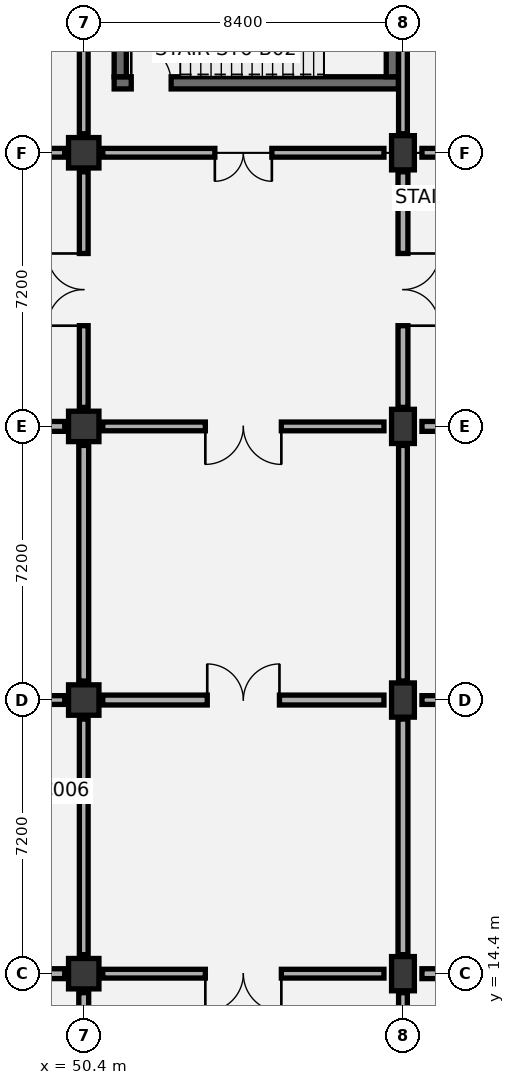
"""IFC4 building model, lengths in metres.
Left out: names, types, materials, properties, quantities, classifications, styles, units other than length and angle.
Written with IfcOpenShell. Run it as: python <this file> out.ifc"""

import sys

from ifc_helpers import new_model, si_unit, direction, frame, frame_2d, origin, origin_2d, place, context, subcontext, project, spatial, rectangle, extrude, element, fill, save


model = new_model("IFC4")
c1 = context("Model", 3, precision=1e-05, world=origin(), true_north=direction((0.0, 1.0)))
c2 = subcontext(c1, "Body", "Model", "MODEL_VIEW")
j1 = project(units=[si_unit("LENGTHUNIT", "METRE"), si_unit("PLANEANGLEUNIT", "RADIAN")], contexts=[c1])
p1 = place(None, origin())
s1 = spatial("IfcSite", under=j1, at=p1, CompositionType="ELEMENT")
p2 = place(p1, origin())
s2 = spatial("IfcBuilding", under=s1, at=p2, CompositionType="ELEMENT")
p3 = place(p2, frame((0.0, 0.0, -9.6)))
s3 = spatial("IfcBuildingStorey", under=s2, at=p3, CompositionType="ELEMENT", Elevation=-9.6)
for number, where, z_axis, x_axis in (
    (1, (50.4, 14.4, 0.0), (0.0, 0.0, 1.0), (1.0, 0.0, 0.0)),
    (2, (50.4, 21.6, 0.0), (0.0, 0.0, 1.0), (1.0, 0.0, 0.0)),
    (3, (50.4, 28.8, 0.0), (0.0, 0.0, 1.0), (1.0, 0.0, 0.0)),
    (4, (50.4, 36.0, 0.0), (0.0, 0.0, 1.0), (1.0, 0.0, 0.0)),
):
    element("IfcColumn", number, at=place(p3, frame(where, z_axis=z_axis, x_axis=x_axis)), inside=s3, PredefinedType="COLUMN", context=c2, shape_type="SweptSolid", body=[
        extrude(rectangle(XDim=0.8, YDim=0.8, at=origin_2d()), origin(), (0.0, 0.0, 1.0), 4.8),
    ])
for number, where, z_axis, x_axis in (
    (5, (58.8, 14.4, 0.0), (0.0, 0.0, 1.0), (1.0, 0.0, 0.0)),
    (6, (58.8, 21.6, 0.0), (0.0, 0.0, 1.0), (1.0, 0.0, 0.0)),
    (7, (58.8, 28.8, 0.0), (0.0, 0.0, 1.0), (1.0, 0.0, 0.0)),
    (8, (58.8, 36.0, 0.0), (0.0, 0.0, 1.0), (1.0, 0.0, 0.0)),
):
    element("IfcColumn", number, at=place(p3, frame(where, z_axis=z_axis, x_axis=x_axis)), inside=s3, PredefinedType="COLUMN", context=c2, shape_type="SweptSolid", body=[
        extrude(rectangle(XDim=0.6, YDim=0.9, at=origin_2d()), origin(), (0.0, 0.0, 1.0), 4.8),
    ])
p4 = place(p3, frame((51.2, 37.84, 0.0), z_axis=(0.0, 0.0, 1.0), x_axis=(1.0, 0.0, 0.0)))
e9 = element("IfcWall", 9, at=p4, inside=s3, PredefinedType="SHEAR", context=c2, shape_type="SweptSolid", body=[
    extrude(rectangle(XDim=7.48, YDim=0.32, at=frame_2d((3.74, 0.0))), origin(), (0.0, 0.0, 1.0), 4.4),
])
p5 = place(p4, frame((0.45, 0.0, 0.0)))
e10 = element("IfcOpeningElement", 10, at=p5, cuts=e9, PredefinedType="OPENING", context=c2, shape_type="SweptSolid", body=[
    extrude(rectangle(XDim=1.05, YDim=2.15, at=frame_2d((0.525, 1.075))), frame((0.0, 0.17, 0.0), z_axis=(0.0, -1.0, 0.0), x_axis=(1.0, 0.0, 0.0)), (0.0, 0.0, 1.0), 0.34),
])
for number, where, z_axis, x_axis in (
    (11, (51.36, 38.0, 0.0), (0.0, 0.0, 1.0), (0.0, 1.0, 0.0)),
    (12, (58.52, 38.0, 0.0), (0.0, 0.0, 1.0), (0.0, 1.0, 0.0)),
):
    element("IfcWall", number, at=place(p3, frame(where, z_axis=z_axis, x_axis=x_axis)), inside=s3, PredefinedType="SHEAR", context=c2, shape_type="SweptSolid", body=[
        extrude(rectangle(XDim=3.8, YDim=0.32, at=frame_2d((1.9, 0.0))), origin(), (0.0, 0.0, 1.0), 4.4),
    ])
p6 = place(p3, frame((42.15, 19.2, 0.0), z_axis=(0.0, 0.0, 1.0), x_axis=(1.0, 0.0, 0.0)))
e13 = element("IfcWall", 13, at=p6, inside=s3, PredefinedType="PARTITIONING", context=c2, shape_type="SweptSolid", body=[
    extrude(rectangle(XDim=8.1, YDim=0.12, at=frame_2d((4.05, 0.0))), origin(), (0.0, 0.0, 1.0), 4.4),
])
p7 = place(p6, frame((1.08, 0.0, 0.0)))
e14 = element("IfcOpeningElement", 14, at=p7, cuts=e13, PredefinedType="OPENING", context=c2, shape_type="SweptSolid", body=[
    extrude(rectangle(XDim=0.95, YDim=2.1, at=frame_2d((0.475, 1.05))), frame((0.0, 0.07, 0.0), z_axis=(0.0, -1.0, 0.0), x_axis=(1.0, 0.0, 0.0)), (0.0, 0.0, 1.0), 0.14),
])
p8 = place(p6, frame((3.63, 0.0, 0.0)))
e15 = element("IfcOpeningElement", 15, at=p8, cuts=e13, PredefinedType="OPENING", context=c2, shape_type="SweptSolid", body=[
    extrude(rectangle(XDim=0.9, YDim=2.1, at=frame_2d((0.45, 1.05))), frame((0.0, 0.07, 0.0), z_axis=(0.0, -1.0, 0.0), x_axis=(1.0, 0.0, 0.0)), (0.0, 0.0, 1.0), 0.14),
])
p9 = place(p6, frame((6.13, 0.0, 0.0)))
e16 = element("IfcOpeningElement", 16, at=p9, cuts=e13, PredefinedType="OPENING", context=c2, shape_type="SweptSolid", body=[
    extrude(rectangle(XDim=1.0, YDim=2.1, at=frame_2d((0.5, 1.05))), frame((0.0, 0.07, 0.0), z_axis=(0.0, -1.0, 0.0), x_axis=(1.0, 0.0, 0.0)), (0.0, 0.0, 1.0), 0.14),
])
p10 = place(p3, frame((50.4, 7.7, 0.0), z_axis=(0.0, 0.0, 1.0), x_axis=(0.0, 1.0, 0.0)))
e17 = element("IfcWall", 17, at=p10, inside=s3, PredefinedType="PARTITIONING", context=c2, shape_type="SweptSolid", body=[
    extrude(rectangle(XDim=6.2, YDim=0.26, at=frame_2d((3.1, 0.0))), origin(), (0.0, 0.0, 1.0), 3.595),
])
p11 = place(p10, frame((2.1, 0.0, 0.0)))
e18 = element("IfcOpeningElement", 18, at=p11, cuts=e17, PredefinedType="OPENING", context=c2, shape_type="SweptSolid", body=[
    extrude(rectangle(XDim=2.0, YDim=2.35, at=frame_2d((1.0, 1.175))), frame((0.0, 0.14, 0.0), z_axis=(0.0, -1.0, 0.0), x_axis=(1.0, 0.0, 0.0)), (0.0, 0.0, 1.0), 0.28),
])
p12 = place(p3, frame((42.5, 14.4, 0.0), z_axis=(0.0, 0.0, 1.0), x_axis=(1.0, 0.0, 0.0)))
e19 = element("IfcWall", 19, at=p12, inside=s3, PredefinedType="PARTITIONING", context=c2, shape_type="SweptSolid", body=[
    extrude(rectangle(XDim=7.4, YDim=0.26, at=frame_2d((3.7, 0.0))), origin(), (0.0, 0.0, 1.0), 3.495),
])
p13 = place(p3, frame((50.4, 14.9, 0.0), z_axis=(0.0, 0.0, 1.0), x_axis=(0.0, 1.0, 0.0)))
e20 = element("IfcWall", 20, at=p13, inside=s3, PredefinedType="PARTITIONING", context=c2, shape_type="SweptSolid", body=[
    extrude(rectangle(XDim=6.2, YDim=0.23, at=frame_2d((3.1, 0.0))), origin(), (0.0, 0.0, 1.0), 3.595),
])
p14 = place(p3, frame((42.5, 21.6, 0.0), z_axis=(0.0, 0.0, 1.0), x_axis=(1.0, 0.0, 0.0)))
e21 = element("IfcWall", 21, at=p14, inside=s3, PredefinedType="PARTITIONING", context=c2, shape_type="SweptSolid", body=[
    extrude(rectangle(XDim=7.4, YDim=0.23, at=frame_2d((3.7, 0.0))), origin(), (0.0, 0.0, 1.0), 3.495),
])
p15 = place(p14, frame((2.75, 0.0, 0.0)))
e22 = element("IfcOpeningElement", 22, at=p15, cuts=e21, PredefinedType="OPENING", context=c2, shape_type="SweptSolid", body=[
    extrude(rectangle(XDim=1.9, YDim=2.3, at=frame_2d((0.95, 1.15))), frame((0.0, 0.125, 0.0), z_axis=(0.0, -1.0, 0.0), x_axis=(1.0, 0.0, 0.0)), (0.0, 0.0, 1.0), 0.25),
])
p16 = place(p3, frame((50.4, 22.1, 0.0), z_axis=(0.0, 0.0, 1.0), x_axis=(0.0, 1.0, 0.0)))
e23 = element("IfcWall", 23, at=p16, inside=s3, PredefinedType="PARTITIONING", context=c2, shape_type="SweptSolid", body=[
    extrude(rectangle(XDim=6.2, YDim=0.26, at=frame_2d((3.1, 0.0))), origin(), (0.0, 0.0, 1.0), 3.595),
])
p17 = place(p3, frame((42.5, 28.8, 0.0), z_axis=(0.0, 0.0, 1.0), x_axis=(1.0, 0.0, 0.0)))
e24 = element("IfcWall", 24, at=p17, inside=s3, PredefinedType="PARTITIONING", context=c2, shape_type="SweptSolid", body=[
    extrude(rectangle(XDim=7.4, YDim=0.26, at=frame_2d((3.7, 0.0))), origin(), (0.0, 0.0, 1.0), 3.495),
])
p18 = place(p17, frame((2.7, 0.0, 0.0)))
e25 = element("IfcOpeningElement", 25, at=p18, cuts=e24, PredefinedType="OPENING", context=c2, shape_type="SweptSolid", body=[
    extrude(rectangle(XDim=2.0, YDim=2.35, at=frame_2d((1.0, 1.175))), frame((0.0, 0.14, 0.0), z_axis=(0.0, -1.0, 0.0), x_axis=(1.0, 0.0, 0.0)), (0.0, 0.0, 1.0), 0.28),
])
p19 = place(p3, frame((50.4, 29.3, 0.0), z_axis=(0.0, 0.0, 1.0), x_axis=(0.0, 1.0, 0.0)))
e26 = element("IfcWall", 26, at=p19, inside=s3, PredefinedType="PARTITIONING", context=c2, shape_type="SweptSolid", body=[
    extrude(rectangle(XDim=6.2, YDim=0.23, at=frame_2d((3.1, 0.0))), origin(), (0.0, 0.0, 1.0), 3.595),
])
p20 = place(p19, frame((2.15, 0.0, 0.0)))
e27 = element("IfcOpeningElement", 27, at=p20, cuts=e26, PredefinedType="OPENING", context=c2, shape_type="SweptSolid", body=[
    extrude(rectangle(XDim=1.9, YDim=2.3, at=frame_2d((0.95, 1.15))), frame((0.0, 0.125, 0.0), z_axis=(0.0, -1.0, 0.0), x_axis=(1.0, 0.0, 0.0)), (0.0, 0.0, 1.0), 0.25),
])
p21 = place(p3, frame((42.5, 36.0, 0.0), z_axis=(0.0, 0.0, 1.0), x_axis=(1.0, 0.0, 0.0)))
e28 = element("IfcWall", 28, at=p21, inside=s3, PredefinedType="PARTITIONING", context=c2, shape_type="SweptSolid", body=[
    extrude(rectangle(XDim=7.4, YDim=0.23, at=frame_2d((3.7, 0.0))), origin(), (0.0, 0.0, 1.0), 3.495),
])
p22 = place(p21, frame((2.95, 0.0, 0.0)))
e29 = element("IfcOpeningElement", 29, at=p22, cuts=e28, PredefinedType="OPENING", context=c2, shape_type="SweptSolid", body=[
    extrude(rectangle(XDim=1.5, YDim=2.15, at=frame_2d((0.75, 1.075))), frame((0.0, 0.125, 0.0), z_axis=(0.0, -1.0, 0.0), x_axis=(1.0, 0.0, 0.0)), (0.0, 0.0, 1.0), 0.25),
])
for number, where, z_axis, x_axis in (
    (30, (50.4, 36.5, 0.0), (0.0, 0.0, 1.0), (0.0, 1.0, 0.0)),
    (31, (58.8, 7.7, 0.0), (0.0, 0.0, 1.0), (0.0, 1.0, 0.0)),
):
    element("IfcWall", number, at=place(p3, frame(where, z_axis=z_axis, x_axis=x_axis)), inside=s3, PredefinedType="PARTITIONING", context=c2, shape_type="SweptSolid", body=[
        extrude(rectangle(XDim=6.2, YDim=0.23, at=frame_2d((3.1, 0.0))), origin(), (0.0, 0.0, 1.0), 3.595),
    ])
p23 = place(p3, frame((50.9, 14.4, 0.0), z_axis=(0.0, 0.0, 1.0), x_axis=(1.0, 0.0, 0.0)))
e32 = element("IfcWall", 32, at=p23, inside=s3, PredefinedType="PARTITIONING", context=c2, shape_type="SweptSolid", body=[
    extrude(rectangle(XDim=7.4, YDim=0.23, at=frame_2d((3.7, 0.0))), origin(), (0.0, 0.0, 1.0), 3.495),
])
p24 = place(p23, frame((2.7, 0.0, 0.0)))
e33 = element("IfcOpeningElement", 33, at=p24, cuts=e32, PredefinedType="OPENING", context=c2, shape_type="SweptSolid", body=[
    extrude(rectangle(XDim=2.0, YDim=2.35, at=frame_2d((1.0, 1.175))), frame((0.0, 0.125, 0.0), z_axis=(0.0, -1.0, 0.0), x_axis=(1.0, 0.0, 0.0)), (0.0, 0.0, 1.0), 0.25),
])
p25 = place(p3, frame((58.8, 14.9, 0.0), z_axis=(0.0, 0.0, 1.0), x_axis=(0.0, 1.0, 0.0)))
e34 = element("IfcWall", 34, at=p25, inside=s3, PredefinedType="PARTITIONING", context=c2, shape_type="SweptSolid", body=[
    extrude(rectangle(XDim=6.2, YDim=0.26, at=frame_2d((3.1, 0.0))), origin(), (0.0, 0.0, 1.0), 3.595),
])
p26 = place(p3, frame((50.9, 21.6, 0.0), z_axis=(0.0, 0.0, 1.0), x_axis=(1.0, 0.0, 0.0)))
e35 = element("IfcWall", 35, at=p26, inside=s3, PredefinedType="PARTITIONING", context=c2, shape_type="SweptSolid", body=[
    extrude(rectangle(XDim=7.4, YDim=0.26, at=frame_2d((3.7, 0.0))), origin(), (0.0, 0.0, 1.0), 3.495),
])
p27 = place(p26, frame((2.75, 0.0, 0.0)))
e36 = element("IfcOpeningElement", 36, at=p27, cuts=e35, PredefinedType="OPENING", context=c2, shape_type="SweptSolid", body=[
    extrude(rectangle(XDim=1.9, YDim=2.3, at=frame_2d((0.95, 1.15))), frame((0.0, 0.14, 0.0), z_axis=(0.0, -1.0, 0.0), x_axis=(1.0, 0.0, 0.0)), (0.0, 0.0, 1.0), 0.28),
])
p28 = place(p3, frame((58.8, 22.1, 0.0), z_axis=(0.0, 0.0, 1.0), x_axis=(0.0, 1.0, 0.0)))
e37 = element("IfcWall", 37, at=p28, inside=s3, PredefinedType="PARTITIONING", context=c2, shape_type="SweptSolid", body=[
    extrude(rectangle(XDim=6.2, YDim=0.23, at=frame_2d((3.1, 0.0))), origin(), (0.0, 0.0, 1.0), 3.595),
])
p29 = place(p3, frame((50.9, 28.8, 0.0), z_axis=(0.0, 0.0, 1.0), x_axis=(1.0, 0.0, 0.0)))
e38 = element("IfcWall", 38, at=p29, inside=s3, PredefinedType="PARTITIONING", context=c2, shape_type="SweptSolid", body=[
    extrude(rectangle(XDim=7.4, YDim=0.23, at=frame_2d((3.7, 0.0))), origin(), (0.0, 0.0, 1.0), 3.495),
])
p30 = place(p29, frame((2.7, 0.0, 0.0)))
e39 = element("IfcOpeningElement", 39, at=p30, cuts=e38, PredefinedType="OPENING", context=c2, shape_type="SweptSolid", body=[
    extrude(rectangle(XDim=2.0, YDim=2.35, at=frame_2d((1.0, 1.175))), frame((0.0, 0.125, 0.0), z_axis=(0.0, -1.0, 0.0), x_axis=(1.0, 0.0, 0.0)), (0.0, 0.0, 1.0), 0.25),
])
p31 = place(p3, frame((58.8, 29.3, 0.0), z_axis=(0.0, 0.0, 1.0), x_axis=(0.0, 1.0, 0.0)))
e40 = element("IfcWall", 40, at=p31, inside=s3, PredefinedType="PARTITIONING", context=c2, shape_type="SweptSolid", body=[
    extrude(rectangle(XDim=6.2, YDim=0.26, at=frame_2d((3.1, 0.0))), origin(), (0.0, 0.0, 1.0), 3.595),
])
p32 = place(p31, frame((2.15, 0.0, 0.0)))
e41 = element("IfcOpeningElement", 41, at=p32, cuts=e40, PredefinedType="OPENING", context=c2, shape_type="SweptSolid", body=[
    extrude(rectangle(XDim=1.9, YDim=2.3, at=frame_2d((0.95, 1.15))), frame((0.0, 0.14, 0.0), z_axis=(0.0, -1.0, 0.0), x_axis=(1.0, 0.0, 0.0)), (0.0, 0.0, 1.0), 0.28),
])
p33 = place(p3, frame((50.9, 36.0, 0.0), z_axis=(0.0, 0.0, 1.0), x_axis=(1.0, 0.0, 0.0)))
e42 = element("IfcWall", 42, at=p33, inside=s3, PredefinedType="PARTITIONING", context=c2, shape_type="SweptSolid", body=[
    extrude(rectangle(XDim=7.4, YDim=0.23, at=frame_2d((3.7, 0.0))), origin(), (0.0, 0.0, 1.0), 3.495),
])
p34 = place(p33, frame((2.95, 0.0, 0.0)))
e43 = element("IfcOpeningElement", 43, at=p34, cuts=e42, PredefinedType="OPENING", context=c2, shape_type="SweptSolid", body=[
    extrude(rectangle(XDim=1.5, YDim=2.15, at=frame_2d((0.75, 1.075))), frame((0.0, 0.125, 0.0), z_axis=(0.0, -1.0, 0.0), x_axis=(1.0, 0.0, 0.0)), (0.0, 0.0, 1.0), 0.25),
])
p35 = place(p3, frame((58.8, 36.5, 0.0), z_axis=(0.0, 0.0, 1.0), x_axis=(0.0, 1.0, 0.0)))
e44 = element("IfcWall", 44, at=p35, inside=s3, PredefinedType="PARTITIONING", context=c2, shape_type="SweptSolid", body=[
    extrude(rectangle(XDim=6.2, YDim=0.23, at=frame_2d((3.1, 0.0))), origin(), (0.0, 0.0, 1.0), 3.595),
])
p36 = place(p3, frame((59.3, 14.4, 0.0), z_axis=(0.0, 0.0, 1.0), x_axis=(1.0, 0.0, 0.0)))
e45 = element("IfcWall", 45, at=p36, inside=s3, PredefinedType="PARTITIONING", context=c2, shape_type="SweptSolid", body=[
    extrude(rectangle(XDim=7.4, YDim=0.26, at=frame_2d((3.7, 0.0))), origin(), (0.0, 0.0, 1.0), 3.495),
])
p37 = place(p36, frame((2.7, 0.0, 0.0)))
e46 = element("IfcOpeningElement", 46, at=p37, cuts=e45, PredefinedType="OPENING", context=c2, shape_type="SweptSolid", body=[
    extrude(rectangle(XDim=2.0, YDim=2.35, at=frame_2d((1.0, 1.175))), frame((0.0, 0.14, 0.0), z_axis=(0.0, -1.0, 0.0), x_axis=(1.0, 0.0, 0.0)), (0.0, 0.0, 1.0), 0.28),
])
p38 = place(p3, frame((59.3, 21.6, 0.0), z_axis=(0.0, 0.0, 1.0), x_axis=(1.0, 0.0, 0.0)))
e47 = element("IfcWall", 47, at=p38, inside=s3, PredefinedType="PARTITIONING", context=c2, shape_type="SweptSolid", body=[
    extrude(rectangle(XDim=7.4, YDim=0.23, at=frame_2d((3.7, 0.0))), origin(), (0.0, 0.0, 1.0), 3.495),
])
p39 = place(p38, frame((2.75, 0.0, 0.0)))
e48 = element("IfcOpeningElement", 48, at=p39, cuts=e47, PredefinedType="OPENING", context=c2, shape_type="SweptSolid", body=[
    extrude(rectangle(XDim=1.9, YDim=2.3, at=frame_2d((0.95, 1.15))), frame((0.0, 0.125, 0.0), z_axis=(0.0, -1.0, 0.0), x_axis=(1.0, 0.0, 0.0)), (0.0, 0.0, 1.0), 0.25),
])
p40 = place(p3, frame((59.3, 28.8, 0.0), z_axis=(0.0, 0.0, 1.0), x_axis=(1.0, 0.0, 0.0)))
e49 = element("IfcWall", 49, at=p40, inside=s3, PredefinedType="PARTITIONING", context=c2, shape_type="SweptSolid", body=[
    extrude(rectangle(XDim=7.4, YDim=0.26, at=frame_2d((3.7, 0.0))), origin(), (0.0, 0.0, 1.0), 3.495),
])
p41 = place(p40, frame((2.7, 0.0, 0.0)))
e50 = element("IfcOpeningElement", 50, at=p41, cuts=e49, PredefinedType="OPENING", context=c2, shape_type="SweptSolid", body=[
    extrude(rectangle(XDim=2.0, YDim=2.35, at=frame_2d((1.0, 1.175))), frame((0.0, 0.14, 0.0), z_axis=(0.0, -1.0, 0.0), x_axis=(1.0, 0.0, 0.0)), (0.0, 0.0, 1.0), 0.28),
])
p42 = place(p3, frame((59.3, 36.0, 0.0), z_axis=(0.0, 0.0, 1.0), x_axis=(1.0, 0.0, 0.0)))
e51 = element("IfcWall", 51, at=p42, inside=s3, PredefinedType="PARTITIONING", context=c2, shape_type="SweptSolid", body=[
    extrude(rectangle(XDim=7.4, YDim=0.23, at=frame_2d((3.7, 0.0))), origin(), (0.0, 0.0, 1.0), 3.495),
])
p43 = place(p42, frame((2.75, 0.0, 0.0)))
e52 = element("IfcOpeningElement", 52, at=p43, cuts=e51, PredefinedType="OPENING", context=c2, shape_type="SweptSolid", body=[
    extrude(rectangle(XDim=1.9, YDim=2.3, at=frame_2d((0.95, 1.15))), frame((0.0, 0.125, 0.0), z_axis=(0.0, -1.0, 0.0), x_axis=(1.0, 0.0, 0.0)), (0.0, 0.0, 1.0), 0.25),
])
p44 = place(p5, origin())
e53 = element("IfcDoor", 53, at=p44, inside=s3, OperationType="SINGLE_SWING_LEFT", PredefinedType="DOOR", context=c2, shape_type="SweptSolid", body=[
    extrude(rectangle(XDim=1.05, YDim=2.15, at=frame_2d((0.525, 1.075))), frame((0.0, 0.025, 0.0), z_axis=(0.0, -1.0, 0.0), x_axis=(1.0, 0.0, 0.0)), (0.0, 0.0, 1.0), 0.05),
])
fill(e10, e53)
p45 = place(p20, origin())
e54 = element("IfcDoor", 54, at=p45, inside=s3, OperationType="DOUBLE_DOOR_SINGLE_SWING", PredefinedType="DOOR", context=c2, shape_type="SweptSolid", body=[
    extrude(rectangle(XDim=1.9, YDim=2.3, at=frame_2d((0.95, 1.15))), frame((0.0, 0.025, 0.0), z_axis=(0.0, -1.0, 0.0), x_axis=(1.0, 0.0, 0.0)), (0.0, 0.0, 1.0), 0.05),
])
fill(e27, e54)
p46 = place(p24, frame((2.0, 0.0, 0.0), z_axis=(0.0, 0.0, 1.0), x_axis=(-1.0, 0.0, 0.0)))
e55 = element("IfcDoor", 55, at=p46, inside=s3, OperationType="DOUBLE_DOOR_SINGLE_SWING", PredefinedType="DOOR", context=c2, shape_type="SweptSolid", body=[
    extrude(rectangle(XDim=2.0, YDim=2.35, at=frame_2d((1.0, 1.175))), frame((0.0, 0.025, 0.0), z_axis=(0.0, -1.0, 0.0), x_axis=(1.0, 0.0, 0.0)), (0.0, 0.0, 1.0), 0.05),
])
fill(e33, e55)
p47 = place(p27, origin())
e56 = element("IfcDoor", 56, at=p47, inside=s3, OperationType="DOUBLE_DOOR_SINGLE_SWING", PredefinedType="DOOR", context=c2, shape_type="SweptSolid", body=[
    extrude(rectangle(XDim=1.9, YDim=2.3, at=frame_2d((0.95, 1.15))), frame((0.0, 0.025, 0.0), z_axis=(0.0, -1.0, 0.0), x_axis=(1.0, 0.0, 0.0)), (0.0, 0.0, 1.0), 0.05),
])
fill(e36, e56)
p48 = place(p30, frame((2.0, 0.0, 0.0), z_axis=(0.0, 0.0, 1.0), x_axis=(-1.0, 0.0, 0.0)))
e57 = element("IfcDoor", 57, at=p48, inside=s3, OperationType="DOUBLE_DOOR_SINGLE_SWING", PredefinedType="DOOR", context=c2, shape_type="SweptSolid", body=[
    extrude(rectangle(XDim=2.0, YDim=2.35, at=frame_2d((1.0, 1.175))), frame((0.0, 0.025, 0.0), z_axis=(0.0, -1.0, 0.0), x_axis=(1.0, 0.0, 0.0)), (0.0, 0.0, 1.0), 0.05),
])
fill(e39, e57)
p49 = place(p32, frame((1.9, 0.0, 0.0), z_axis=(0.0, 0.0, 1.0), x_axis=(-1.0, 0.0, 0.0)))
e58 = element("IfcDoor", 58, at=p49, inside=s3, OperationType="DOUBLE_DOOR_SINGLE_SWING", PredefinedType="DOOR", context=c2, shape_type="SweptSolid", body=[
    extrude(rectangle(XDim=1.9, YDim=2.3, at=frame_2d((0.95, 1.15))), frame((0.0, 0.025, 0.0), z_axis=(0.0, -1.0, 0.0), x_axis=(1.0, 0.0, 0.0)), (0.0, 0.0, 1.0), 0.05),
])
fill(e41, e58)
p50 = place(p34, frame((1.5, 0.0, 0.0), z_axis=(0.0, 0.0, 1.0), x_axis=(-1.0, 0.0, 0.0)))
e59 = element("IfcDoor", 59, at=p50, inside=s3, OperationType="DOUBLE_DOOR_SINGLE_SWING", PredefinedType="DOOR", context=c2, shape_type="SweptSolid", body=[
    extrude(rectangle(XDim=1.5, YDim=2.15, at=frame_2d((0.75, 1.075))), frame((0.0, 0.025, 0.0), z_axis=(0.0, -1.0, 0.0), x_axis=(1.0, 0.0, 0.0)), (0.0, 0.0, 1.0), 0.05),
])
fill(e43, e59)
save(model, sys.argv[1])
